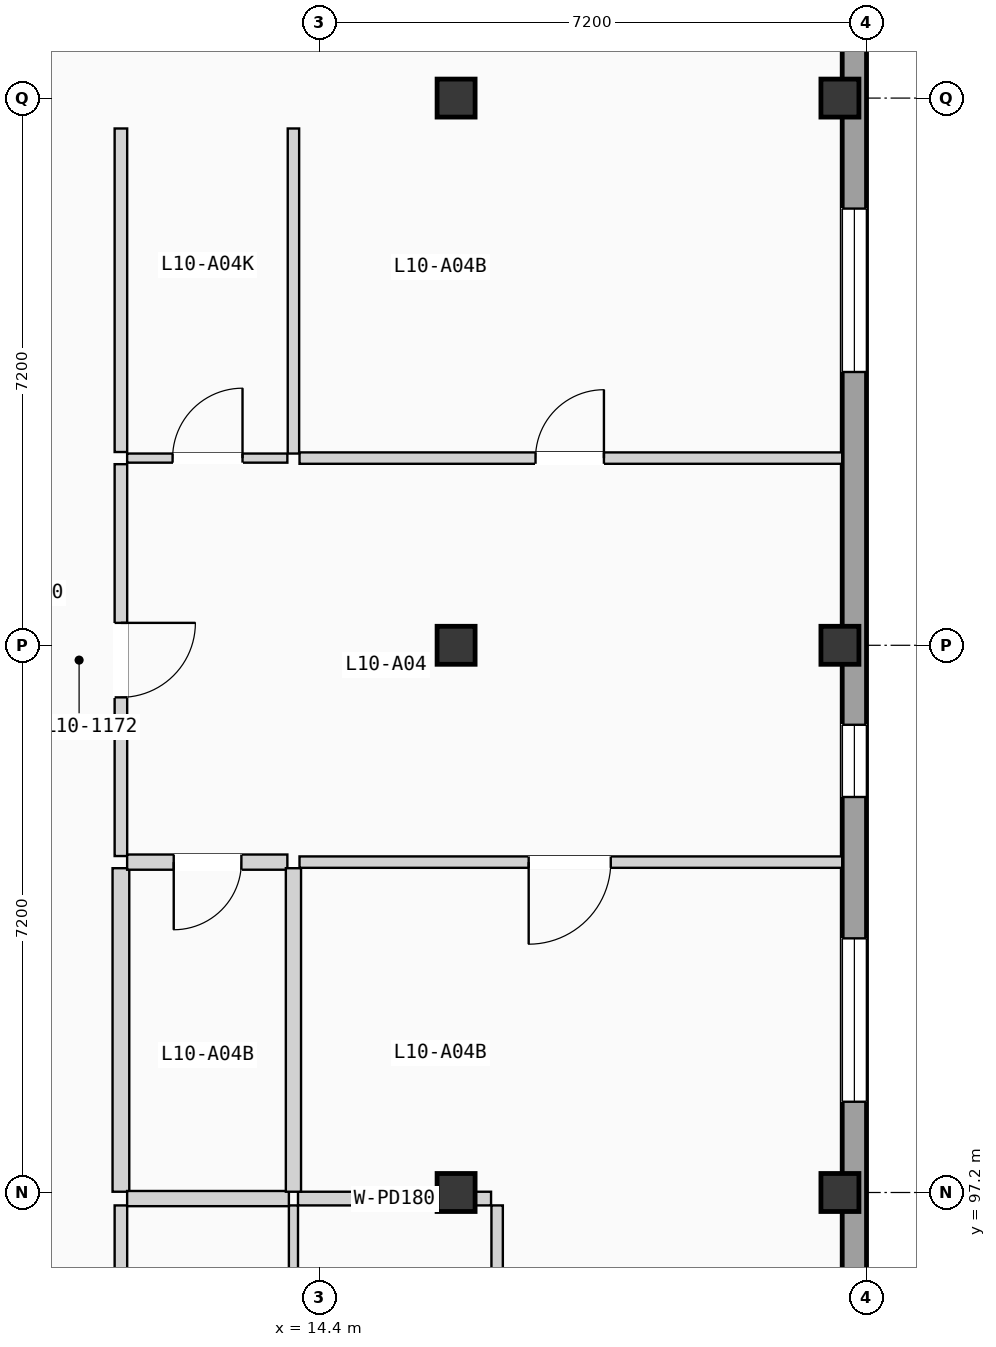
"""IFC4 building model, lengths in metres.
Left out: names, types, materials, properties, quantities, classifications, styles, units other than length and angle.
Written with IfcOpenShell. Run it as: python <this file> out.ifc"""

import sys

from ifc_helpers import new_model, si_unit, direction, frame, frame_2d, origin, origin_2d, place, context, subcontext, project, spatial, rectangle, extrude, element, fill, save


model = new_model("IFC4")
c1 = context("Model", 3, precision=1e-05, world=origin(), true_north=direction((0.0, 1.0)))
c2 = subcontext(c1, "Body", "Model", "MODEL_VIEW")
j1 = project(units=[si_unit("LENGTHUNIT", "METRE"), si_unit("PLANEANGLEUNIT", "RADIAN")], contexts=[c1])
p1 = place(None, origin())
s1 = spatial("IfcSite", under=j1, at=p1, CompositionType="ELEMENT")
p2 = place(p1, origin())
s2 = spatial("IfcBuilding", under=s1, at=p2, CompositionType="ELEMENT")
p3 = place(p2, frame((0.0, 0.0, 34.125)))
s3 = spatial("IfcBuildingStorey", under=s2, at=p3, CompositionType="ELEMENT", Elevation=34.125)
for number, where, z_axis, x_axis in (
    (1, (16.2, 97.2, 0.0), (0.0, 0.0, 1.0), (1.0, 0.0, 0.0)),
    (2, (16.2, 104.4, 0.0), (0.0, 0.0, 1.0), (1.0, 0.0, 0.0)),
    (3, (16.2, 111.6, 0.0), (0.0, 0.0, 1.0), (1.0, 0.0, 0.0)),
    (4, (21.25, 97.2, 0.0), (0.0, 0.0, 1.0), (1.0, 0.0, 0.0)),
    (5, (21.25, 104.4, 0.0), (0.0, 0.0, 1.0), (1.0, 0.0, 0.0)),
    (6, (21.25, 111.6, 0.0), (0.0, 0.0, 1.0), (1.0, 0.0, 0.0)),
):
    element("IfcColumn", number, at=place(p3, frame(where, z_axis=z_axis, x_axis=x_axis)), inside=s3, PredefinedType="COLUMN", context=c2, shape_type="SweptSolid", body=[
        extrude(rectangle(XDim=0.5, YDim=0.5, at=origin_2d()), origin(), (0.0, 0.0, 1.0), 3.15),
    ])
p4 = place(p3, frame((21.44, 68.72, 0.0), z_axis=(0.0, 0.0, 1.0), x_axis=(0.0, 1.0, 0.0)))
e7 = element("IfcWall", 7, at=p4, inside=s3, PredefinedType="SOLIDWALL", context=c2, shape_type="SweptSolid", body=[
    extrude(rectangle(XDim=49.76, YDim=0.32, at=frame_2d((24.88, 0.0))), origin(), (0.0, 0.0, 1.0), 2.89),
])
p5 = place(p4, frame((16.68, 0.0, 0.555)))
e8 = element("IfcOpeningElement", 8, at=p5, cuts=e7, PredefinedType="OPENING", context=c2, shape_type="SweptSolid", body=[
    extrude(rectangle(XDim=2.0, YDim=1.65, at=frame_2d((1.0, 0.825))), frame((0.0, 0.17, 0.0), z_axis=(0.0, -1.0, 0.0), x_axis=(1.0, 0.0, 0.0)), (0.0, 0.0, 1.0), 0.34),
])
p6 = place(p4, frame((10.07, 0.0, 0.85)))
e9 = element("IfcOpeningElement", 9, at=p6, cuts=e7, PredefinedType="OPENING", context=c2, shape_type="SweptSolid", body=[
    extrude(rectangle(XDim=0.95, YDim=1.2, at=frame_2d((0.475, 0.6))), frame((0.0, 0.17, 0.0), z_axis=(0.0, -1.0, 0.0), x_axis=(1.0, 0.0, 0.0)), (0.0, 0.0, 1.0), 0.34),
])
p7 = place(p4, frame((23.805, 0.0, 0.9)))
e10 = element("IfcOpeningElement", 10, at=p7, cuts=e7, PredefinedType="OPENING", context=c2, shape_type="SweptSolid", body=[
    extrude(rectangle(XDim=2.15, YDim=1.2, at=frame_2d((1.075, 0.6))), frame((0.0, 0.17, 0.0), z_axis=(0.0, -1.0, 0.0), x_axis=(1.0, 0.0, 0.0)), (0.0, 0.0, 1.0), 0.34),
])
p8 = place(p4, frame((33.684, 0.0, 0.85)))
e11 = element("IfcOpeningElement", 11, at=p8, cuts=e7, PredefinedType="OPENING", context=c2, shape_type="SweptSolid", body=[
    extrude(rectangle(XDim=0.95, YDim=1.2, at=frame_2d((0.475, 0.6))), frame((0.0, 0.17, 0.0), z_axis=(0.0, -1.0, 0.0), x_axis=(1.0, 0.0, 0.0)), (0.0, 0.0, 1.0), 0.34),
])
p9 = place(p4, frame((29.674, 0.0, 0.705)))
e12 = element("IfcOpeningElement", 12, at=p9, cuts=e7, PredefinedType="OPENING", context=c2, shape_type="SweptSolid", body=[
    extrude(rectangle(XDim=2.15, YDim=1.5, at=frame_2d((1.075, 0.75))), frame((0.0, 0.17, 0.0), z_axis=(0.0, -1.0, 0.0), x_axis=(1.0, 0.0, 0.0)), (0.0, 0.0, 1.0), 0.34),
])
p10 = place(p4, frame((39.276, 0.0, 0.555)))
e13 = element("IfcOpeningElement", 13, at=p10, cuts=e7, PredefinedType="OPENING", context=c2, shape_type="SweptSolid", body=[
    extrude(rectangle(XDim=2.15, YDim=1.65, at=frame_2d((1.075, 0.825))), frame((0.0, 0.17, 0.0), z_axis=(0.0, -1.0, 0.0), x_axis=(1.0, 0.0, 0.0)), (0.0, 0.0, 1.0), 0.34),
])
p11 = place(p3, frame((11.79, 89.13, 0.0), z_axis=(0.0, 0.0, 1.0), x_axis=(0.0, 1.0, 0.0)))
e14 = element("IfcWall", 14, at=p11, inside=s3, PredefinedType="PARTITIONING", context=c2, shape_type="SweptSolid", body=[
    extrude(rectangle(XDim=7.9, YDim=0.165, at=frame_2d((3.95, 0.0))), origin(), (0.0, 0.0, 1.0), 2.87),
])
p12 = place(p3, frame((11.79, 101.627, 0.0), z_axis=(0.0, 0.0, 1.0), x_axis=(0.0, 1.0, 0.0)))
e15 = element("IfcWall", 15, at=p12, inside=s3, PredefinedType="PARTITIONING", context=c2, shape_type="SweptSolid", body=[
    extrude(rectangle(XDim=5.156, YDim=0.165, at=frame_2d((2.578, 0.0))), origin(), (0.0, 0.0, 1.0), 2.87),
])
p13 = place(p12, frame((2.088, 0.0, 0.0)))
e16 = element("IfcOpeningElement", 16, at=p13, cuts=e15, PredefinedType="OPENING", context=c2, shape_type="SweptSolid", body=[
    extrude(rectangle(XDim=0.98, YDim=2.08, at=frame_2d((0.49, 1.04))), frame((0.0, 0.093, 0.0), z_axis=(0.0, -1.0, 0.0), x_axis=(1.0, 0.0, 0.0)), (0.0, 0.0, 1.0), 0.185),
])
p14 = place(p3, frame((11.79, 97.21, 0.0), z_axis=(0.0, 0.0, 1.0), x_axis=(0.0, 1.0, 0.0)))
e17 = element("IfcWall", 17, at=p14, inside=s3, PredefinedType="PLUMBINGWALL", context=c2, shape_type="SweptSolid", body=[
    extrude(rectangle(XDim=4.257, YDim=0.22, at=frame_2d((2.128, 0.0))), origin(), (0.0, 0.0, 1.0), 2.87),
])
p15 = place(p3, frame((11.79, 106.943, 0.0), z_axis=(0.0, 0.0, 1.0), x_axis=(0.0, 1.0, 0.0)))
e18 = element("IfcWall", 18, at=p15, inside=s3, PredefinedType="PARTITIONING", context=c2, shape_type="SweptSolid", body=[
    extrude(rectangle(XDim=4.257, YDim=0.165, at=frame_2d((2.128, 0.0))), origin(), (0.0, 0.0, 1.0), 2.87),
])
p16 = place(p3, frame((14.06, 89.11, 0.0), z_axis=(0.0, 0.0, 1.0), x_axis=(0.0, 1.0, 0.0)))
e19 = element("IfcWall", 19, at=p16, inside=s3, PredefinedType="PARTITIONING", context=c2, shape_type="SweptSolid", body=[
    extrude(rectangle(XDim=7.92, YDim=0.12, at=frame_2d((3.96, 0.0))), origin(), (0.0, 0.0, 1.0), 2.87),
])
p17 = place(p3, frame((11.872, 97.12, 0.0), z_axis=(0.0, 0.0, 1.0), x_axis=(1.0, 0.0, 0.0)))
e20 = element("IfcWall", 20, at=p17, inside=s3, PredefinedType="PLUMBINGWALL", context=c2, shape_type="SweptSolid", body=[
    extrude(rectangle(XDim=2.128, YDim=0.2, at=frame_2d((1.064, 0.0))), origin(), (0.0, 0.0, 1.0), 2.16),
])
p18 = place(p3, frame((16.74, 89.11, 0.0), z_axis=(0.0, 0.0, 1.0), x_axis=(0.0, 1.0, 0.0)))
e21 = element("IfcWall", 21, at=p18, inside=s3, PredefinedType="PARTITIONING", context=c2, shape_type="SweptSolid", body=[
    extrude(rectangle(XDim=7.92, YDim=0.15, at=frame_2d((3.96, 0.0))), origin(), (0.0, 0.0, 1.0), 2.87),
])
p19 = place(p3, frame((14.12, 97.12, 0.0), z_axis=(0.0, 0.0, 1.0), x_axis=(1.0, 0.0, 0.0)))
e22 = element("IfcWall", 22, at=p19, inside=s3, PredefinedType="PARTITIONING", context=c2, shape_type="SweptSolid", body=[
    extrude(rectangle(XDim=2.54, YDim=0.18, at=frame_2d((1.27, 0.0))), origin(), (0.0, 0.0, 1.0), 2.16),
])
p20 = place(p3, frame((11.872, 101.547, 0.0), z_axis=(0.0, 0.0, 1.0), x_axis=(1.0, 0.0, 0.0)))
e23 = element("IfcWall", 23, at=p20, inside=s3, PredefinedType="PLUMBINGWALL", context=c2, shape_type="SweptSolid", body=[
    extrude(rectangle(XDim=2.108, YDim=0.2, at=frame_2d((1.054, 0.0))), origin(), (0.0, 0.0, 1.0), 2.87),
])
p21 = place(p20, frame((0.613, 0.0, 0.0)))
e24 = element("IfcOpeningElement", 24, at=p21, cuts=e23, PredefinedType="OPENING", context=c2, shape_type="SweptSolid", body=[
    extrude(rectangle(XDim=0.89, YDim=2.03, at=frame_2d((0.445, 1.015))), frame((0.0, 0.11, 0.0), z_axis=(0.0, -1.0, 0.0), x_axis=(1.0, 0.0, 0.0)), (0.0, 0.0, 1.0), 0.22),
])
p22 = place(p3, frame((11.872, 106.863, 0.0), z_axis=(0.0, 0.0, 1.0), x_axis=(1.0, 0.0, 0.0)))
e25 = element("IfcWall", 25, at=p22, inside=s3, PredefinedType="PARTITIONING", context=c2, shape_type="SweptSolid", body=[
    extrude(rectangle(XDim=2.108, YDim=0.12, at=frame_2d((1.054, 0.0))), origin(), (0.0, 0.0, 1.0), 2.87),
])
p23 = place(p22, frame((0.598, 0.0, 0.0)))
e26 = element("IfcOpeningElement", 26, at=p23, cuts=e25, PredefinedType="OPENING", context=c2, shape_type="SweptSolid", body=[
    extrude(rectangle(XDim=0.92, YDim=2.02, at=frame_2d((0.46, 1.01))), frame((0.0, 0.07, 0.0), z_axis=(0.0, -1.0, 0.0), x_axis=(1.0, 0.0, 0.0)), (0.0, 0.0, 1.0), 0.14),
])
p24 = place(p3, frame((14.14, 101.547, 0.0), z_axis=(0.0, 0.0, 1.0), x_axis=(1.0, 0.0, 0.0)))
e27 = element("IfcWall", 27, at=p24, inside=s3, PredefinedType="PARTITIONING", context=c2, shape_type="SweptSolid", body=[
    extrude(rectangle(XDim=7.14, YDim=0.15, at=frame_2d((3.57, 0.0))), origin(), (0.0, 0.0, 1.0), 2.87),
])
p25 = place(p24, frame((3.015, 0.0, 0.0)))
e28 = element("IfcOpeningElement", 28, at=p25, cuts=e27, PredefinedType="OPENING", context=c2, shape_type="SweptSolid", body=[
    extrude(rectangle(XDim=1.08, YDim=2.1, at=frame_2d((0.54, 1.05))), frame((0.0, 0.085, 0.0), z_axis=(0.0, -1.0, 0.0), x_axis=(1.0, 0.0, 0.0)), (0.0, 0.0, 1.0), 0.17),
])
p26 = place(p3, frame((14.14, 106.863, 0.0), z_axis=(0.0, 0.0, 1.0), x_axis=(1.0, 0.0, 0.0)))
e29 = element("IfcWall", 29, at=p26, inside=s3, PredefinedType="PARTITIONING", context=c2, shape_type="SweptSolid", body=[
    extrude(rectangle(XDim=7.14, YDim=0.15, at=frame_2d((3.57, 0.0))), origin(), (0.0, 0.0, 1.0), 2.87),
])
p27 = place(p26, frame((3.105, 0.0, 0.0)))
e30 = element("IfcOpeningElement", 30, at=p27, cuts=e29, PredefinedType="OPENING", context=c2, shape_type="SweptSolid", body=[
    extrude(rectangle(XDim=0.9, YDim=2.04, at=frame_2d((0.45, 1.02))), frame((0.0, 0.085, 0.0), z_axis=(0.0, -1.0, 0.0), x_axis=(1.0, 0.0, 0.0)), (0.0, 0.0, 1.0), 0.17),
])
p28 = place(p3, frame((14.06, 97.21, 0.0), z_axis=(0.0, 0.0, 1.0), x_axis=(0.0, 1.0, 0.0)))
e31 = element("IfcWall", 31, at=p28, inside=s3, PredefinedType="PLUMBINGWALL", context=c2, shape_type="SweptSolid", body=[
    extrude(rectangle(XDim=4.257, YDim=0.2, at=frame_2d((2.128, 0.0))), origin(), (0.0, 0.0, 1.0), 2.87),
])
p29 = place(p3, frame((14.06, 106.923, 0.0), z_axis=(0.0, 0.0, 1.0), x_axis=(0.0, 1.0, 0.0)))
e32 = element("IfcWall", 32, at=p29, inside=s3, PredefinedType="PARTITIONING", context=c2, shape_type="SweptSolid", body=[
    extrude(rectangle(XDim=4.277, YDim=0.15, at=frame_2d((2.138, 0.0))), origin(), (0.0, 0.0, 1.0), 2.87),
])
p30 = place(p8, origin())
e33 = element("IfcWindow", 33, at=p30, inside=s3, PartitioningType="SINGLE_PANEL", PredefinedType="WINDOW", context=c2, shape_type="SweptSolid", body=[
    extrude(rectangle(XDim=0.95, YDim=1.2, at=frame_2d((0.475, 0.6))), frame((0.0, 0.03, 0.0), z_axis=(0.0, -1.0, 0.0), x_axis=(1.0, 0.0, 0.0)), (0.0, 0.0, 1.0), 0.06),
])
fill(e11, e33)
p31 = place(p9, origin())
e34 = element("IfcWindow", 34, at=p31, inside=s3, PartitioningType="DOUBLE_PANEL_VERTICAL", PredefinedType="WINDOW", context=c2, shape_type="SweptSolid", body=[
    extrude(rectangle(XDim=2.15, YDim=1.5, at=frame_2d((1.075, 0.75))), frame((0.0, 0.03, 0.0), z_axis=(0.0, -1.0, 0.0), x_axis=(1.0, 0.0, 0.0)), (0.0, 0.0, 1.0), 0.06),
])
fill(e12, e34)
p32 = place(p10, origin())
e35 = element("IfcWindow", 35, at=p32, inside=s3, PartitioningType="DOUBLE_PANEL_VERTICAL", PredefinedType="WINDOW", context=c2, shape_type="SweptSolid", body=[
    extrude(rectangle(XDim=2.15, YDim=1.65, at=frame_2d((1.075, 0.825))), frame((0.0, 0.03, 0.0), z_axis=(0.0, -1.0, 0.0), x_axis=(1.0, 0.0, 0.0)), (0.0, 0.0, 1.0), 0.06),
])
fill(e13, e35)
p33 = place(p13, frame((0.98, 0.0, 0.0), z_axis=(0.0, 0.0, 1.0), x_axis=(-1.0, 0.0, 0.0)))
e36 = element("IfcDoor", 36, at=p33, inside=s3, OperationType="SINGLE_SWING_RIGHT", PredefinedType="DOOR", context=c2, shape_type="SweptSolid", body=[
    extrude(rectangle(XDim=0.98, YDim=2.08, at=frame_2d((0.49, 1.04))), frame((0.0, 0.025, 0.0), z_axis=(0.0, -1.0, 0.0), x_axis=(1.0, 0.0, 0.0)), (0.0, 0.0, 1.0), 0.05),
])
fill(e16, e36)
p34 = place(p21, frame((0.89, 0.0, 0.0), z_axis=(0.0, 0.0, 1.0), x_axis=(-1.0, 0.0, 0.0)))
e37 = element("IfcDoor", 37, at=p34, inside=s3, OperationType="SINGLE_SWING_LEFT", PredefinedType="DOOR", context=c2, shape_type="SweptSolid", body=[
    extrude(rectangle(XDim=0.89, YDim=2.03, at=frame_2d((0.445, 1.015))), frame((0.0, 0.025, 0.0), z_axis=(0.0, -1.0, 0.0), x_axis=(1.0, 0.0, 0.0)), (0.0, 0.0, 1.0), 0.05),
])
fill(e24, e37)
p35 = place(p23, origin())
e38 = element("IfcDoor", 38, at=p35, inside=s3, OperationType="SINGLE_SWING_RIGHT", PredefinedType="DOOR", context=c2, shape_type="SweptSolid", body=[
    extrude(rectangle(XDim=0.92, YDim=2.02, at=frame_2d((0.46, 1.01))), frame((0.0, 0.025, 0.0), z_axis=(0.0, -1.0, 0.0), x_axis=(1.0, 0.0, 0.0)), (0.0, 0.0, 1.0), 0.05),
])
fill(e26, e38)
p36 = place(p25, frame((1.08, 0.0, 0.0), z_axis=(0.0, 0.0, 1.0), x_axis=(-1.0, 0.0, 0.0)))
e39 = element("IfcDoor", 39, at=p36, inside=s3, OperationType="SINGLE_SWING_LEFT", PredefinedType="DOOR", context=c2, shape_type="SweptSolid", body=[
    extrude(rectangle(XDim=1.08, YDim=2.1, at=frame_2d((0.54, 1.05))), frame((0.0, 0.025, 0.0), z_axis=(0.0, -1.0, 0.0), x_axis=(1.0, 0.0, 0.0)), (0.0, 0.0, 1.0), 0.05),
])
fill(e28, e39)
p37 = place(p27, origin())
e40 = element("IfcDoor", 40, at=p37, inside=s3, OperationType="SINGLE_SWING_RIGHT", PredefinedType="DOOR", context=c2, shape_type="SweptSolid", body=[
    extrude(rectangle(XDim=0.9, YDim=2.04, at=frame_2d((0.45, 1.02))), frame((0.0, 0.025, 0.0), z_axis=(0.0, -1.0, 0.0), x_axis=(1.0, 0.0, 0.0)), (0.0, 0.0, 1.0), 0.05),
])
fill(e30, e40)
save(model, sys.argv[1])
